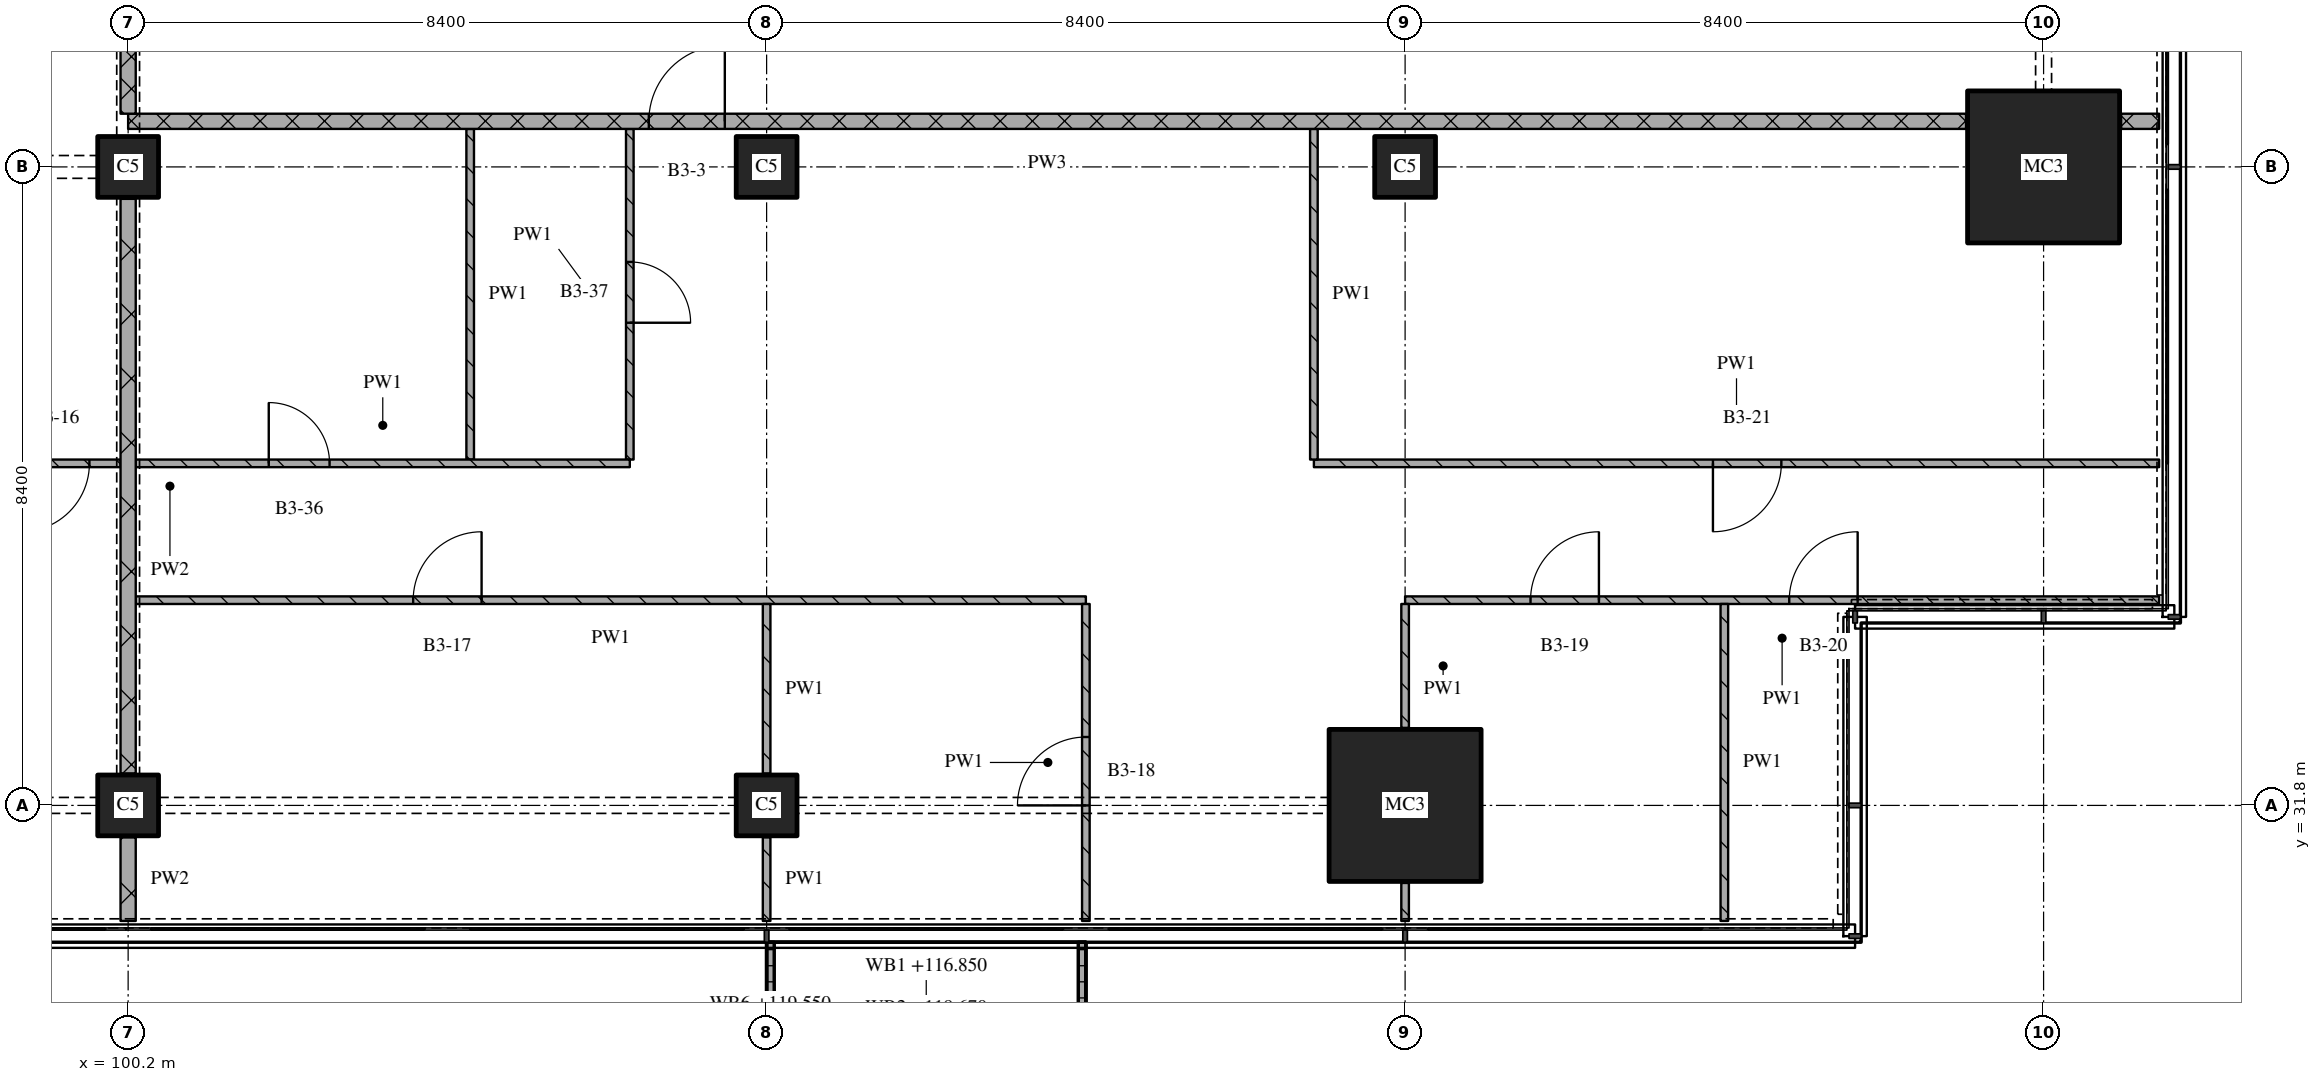
"""IFC4 building model, lengths in metres.
Left out: names, types, materials, properties, quantities, classifications, styles, units other than length and angle.
Written with IfcOpenShell. Run it as: python <this file> out.ifc"""

import sys

from ifc_helpers import new_model, si_unit, direction, frame, frame_2d, origin, origin_2d, place, context, subcontext, project, spatial, polyline, rectangle, outline, extrude, element, fill, save


model = new_model("IFC4")
c1 = context("Model", 3, precision=1e-05, world=origin(), true_north=direction((0.0, 1.0)))
c2 = subcontext(c1, "Body", "Model", "MODEL_VIEW")
j1 = project(units=[si_unit("LENGTHUNIT", "METRE"), si_unit("PLANEANGLEUNIT", "RADIAN")], contexts=[c1])
p1 = place(None, origin())
s1 = spatial("IfcSite", under=j1, at=p1, CompositionType="ELEMENT")
p2 = place(p1, origin())
s2 = spatial("IfcBuilding", under=s1, at=p2, CompositionType="ELEMENT")
p3 = place(p2, frame((0.0, 0.0, 116.85)))
s3 = spatial("IfcBuildingStorey", under=s2, at=p3, CompositionType="ELEMENT", Elevation=116.85)
for number, where, z_axis, x_axis in (
    (1, (100.2, 31.8, 0.0), (0.0, 0.0, 1.0), (1.0, 0.0, 0.0)),
    (2, (100.2, 40.2, 0.0), (0.0, 0.0, 1.0), (1.0, 0.0, 0.0)),
    (3, (108.6, 31.8, 0.0), (0.0, 0.0, 1.0), (1.0, 0.0, 0.0)),
    (4, (108.6, 40.2, 0.0), (0.0, 0.0, 1.0), (1.0, 0.0, 0.0)),
):
    element("IfcColumn", number, at=place(p3, frame(where, z_axis=z_axis, x_axis=x_axis)), inside=s3, PredefinedType="COLUMN", context=c2, shape_type="SweptSolid", body=[
        extrude(rectangle(XDim=0.8, YDim=0.8, at=origin_2d()), origin(), (0.0, 0.0, 1.0), 3.6),
    ])
p4 = place(p3, frame((117.0, 31.8, 0.0), z_axis=(0.0, 0.0, 1.0), x_axis=(1.0, 0.0, 0.0)))
e5 = element("IfcColumn", 5, at=p4, inside=s3, PredefinedType="COLUMN", context=c2, shape_type="SweptSolid", body=[
    extrude(rectangle(XDim=2.0, YDim=2.0, at=origin_2d()), origin(), (0.0, 0.0, 1.0), 3.6),
])
p5 = place(p3, frame((117.0, 40.2, 0.0), z_axis=(0.0, 0.0, 1.0), x_axis=(1.0, 0.0, 0.0)))
e6 = element("IfcColumn", 6, at=p5, inside=s3, PredefinedType="COLUMN", context=c2, shape_type="SweptSolid", body=[
    extrude(rectangle(XDim=0.8, YDim=0.8, at=origin_2d()), origin(), (0.0, 0.0, 1.0), 3.6),
])
p6 = place(p3, frame((125.4, 40.2, 0.0), z_axis=(0.0, 0.0, 1.0), x_axis=(1.0, 0.0, 0.0)))
e7 = element("IfcColumn", 7, at=p6, inside=s3, PredefinedType="COLUMN", context=c2, shape_type="SweptSolid", body=[
    extrude(rectangle(XDim=2.0, YDim=2.0, at=origin_2d()), origin(), (0.0, 0.0, 1.0), 3.6),
])
p7 = place(p3, origin())
e8 = element("IfcWall", 8, at=p7, inside=s3, PredefinedType="SOLIDWALL", context=c2, shape_type="SweptSolid", body=[
    extrude(outline(polyline([(108.6, 30.0), (108.7, 30.0), (108.7, 28.367), (112.7, 28.367), (112.7, 30.0), (112.8, 30.0), (112.8, 28.267), (108.6, 28.267), (108.6, 30.0)])), origin(), (0.0, 0.0, 1.0), 1.0),
])
p8 = place(p3, frame((112.8, 34.5, 0.0), z_axis=(0.0, 0.0, 1.0), x_axis=(-1.0, 0.0, 0.0)))
e9 = element("IfcWall", 9, at=p8, inside=s3, PredefinedType="PARTITIONING", context=c2, shape_type="SweptSolid", body=[
    extrude(rectangle(XDim=12.5, YDim=0.1, at=frame_2d((6.25, 0.0))), origin(), (0.0, 0.0, 1.0), 3.32),
])
p9 = place(p8, frame((7.95, 0.0, 0.0)))
e10 = element("IfcOpeningElement", 10, at=p9, cuts=e9, PredefinedType="OPENING", context=c2, shape_type="SweptSolid", body=[
    extrude(rectangle(XDim=0.9, YDim=2.1, at=frame_2d((0.45, 1.05))), frame((0.0, 0.06, 0.0), z_axis=(0.0, -1.0, 0.0), x_axis=(1.0, 0.0, 0.0)), (0.0, 0.0, 1.0), 0.12),
])
p10 = place(p3, frame((126.92, 34.5, 0.0), z_axis=(0.0, 0.0, 1.0), x_axis=(-1.0, 0.0, 0.0)))
e11 = element("IfcWall", 11, at=p10, inside=s3, PredefinedType="PARTITIONING", context=c2, shape_type="SweptSolid", body=[
    extrude(rectangle(XDim=9.92, YDim=0.1, at=frame_2d((4.96, 0.0))), origin(), (0.0, 0.0, 1.0), 3.32),
])
p11 = place(p10, frame((3.966, 0.0, 0.0)))
e12 = element("IfcOpeningElement", 12, at=p11, cuts=e11, PredefinedType="OPENING", context=c2, shape_type="SweptSolid", body=[
    extrude(rectangle(XDim=0.9, YDim=2.1, at=frame_2d((0.45, 1.05))), frame((0.0, 0.06, 0.0), z_axis=(0.0, -1.0, 0.0), x_axis=(1.0, 0.0, 0.0)), (0.0, 0.0, 1.0), 0.12),
])
p12 = place(p10, frame((7.37, 0.0, 0.0)))
e13 = element("IfcOpeningElement", 13, at=p12, cuts=e11, PredefinedType="OPENING", context=c2, shape_type="SweptSolid", body=[
    extrude(rectangle(XDim=0.9, YDim=2.1, at=frame_2d((0.45, 1.05))), frame((0.0, 0.06, 0.0), z_axis=(0.0, -1.0, 0.0), x_axis=(1.0, 0.0, 0.0)), (0.0, 0.0, 1.0), 0.12),
])
p13 = place(p3, frame((115.8, 36.3, 0.0), z_axis=(0.0, 0.0, 1.0), x_axis=(1.0, 0.0, 0.0)))
e14 = element("IfcWall", 14, at=p13, inside=s3, PredefinedType="PARTITIONING", context=c2, shape_type="SweptSolid", body=[
    extrude(rectangle(XDim=11.12, YDim=0.1, at=frame_2d((5.56, 0.0))), origin(), (0.0, 0.0, 1.0), 3.32),
])
p14 = place(p13, frame((5.25, 0.0, 0.0)))
e15 = element("IfcOpeningElement", 15, at=p14, cuts=e14, PredefinedType="OPENING", context=c2, shape_type="SweptSolid", body=[
    extrude(rectangle(XDim=0.9, YDim=2.1, at=frame_2d((0.45, 1.05))), frame((0.0, 0.06, 0.0), z_axis=(0.0, -1.0, 0.0), x_axis=(1.0, 0.0, 0.0)), (0.0, 0.0, 1.0), 0.12),
])
p15 = place(p3, frame((124.38, 40.8, 0.0), z_axis=(0.0, 0.0, 1.0), x_axis=(-1.0, 0.0, 0.0)))
e16 = element("IfcWall", 16, at=p15, inside=s3, PredefinedType="PARTITIONING", context=c2, shape_type="SweptSolid", body=[
    extrude(rectangle(XDim=24.18, YDim=0.2, at=frame_2d((12.09, 0.0))), origin(), (0.0, 0.0, 1.0), 3.32),
])
p16 = place(p15, frame((16.33, 0.0, 0.0)))
e17 = element("IfcOpeningElement", 17, at=p16, cuts=e16, PredefinedType="OPENING", context=c2, shape_type="SweptSolid", body=[
    extrude(rectangle(XDim=1.0, YDim=2.1, at=frame_2d((0.5, 1.05))), frame((0.0, 0.11, 0.0), z_axis=(0.0, -1.0, 0.0), x_axis=(1.0, 0.0, 0.0)), (0.0, 0.0, 1.0), 0.22),
])
p17 = place(p3, frame((126.42, 40.8, 0.0), z_axis=(0.0, 0.0, 1.0), x_axis=(1.0, 0.0, 0.0)))
e18 = element("IfcWall", 18, at=p17, inside=s3, PredefinedType="PARTITIONING", context=c2, shape_type="SweptSolid", body=[
    extrude(rectangle(XDim=0.5, YDim=0.2, at=frame_2d((0.25, 0.0))), origin(), (0.0, 0.0, 1.0), 3.32),
])
p18 = place(p3, frame((100.2, 43.1, 0.0), z_axis=(0.0, 0.0, 1.0), x_axis=(0.0, -1.0, 0.0)))
e19 = element("IfcWall", 19, at=p18, inside=s3, PredefinedType="PARTITIONING", context=c2, shape_type="SweptSolid", body=[
    extrude(rectangle(XDim=2.2, YDim=0.2, at=frame_2d((1.1, 0.0))), origin(), (0.0, 0.0, 1.0), 2.43),
])
p19 = place(p3, frame((100.2, 31.38, 0.0), z_axis=(0.0, 0.0, 1.0), x_axis=(0.0, -1.0, 0.0)))
e20 = element("IfcWall", 20, at=p19, inside=s3, PredefinedType="PARTITIONING", context=c2, shape_type="SweptSolid", body=[
    extrude(rectangle(XDim=1.1, YDim=0.2, at=frame_2d((0.55, 0.0))), origin(), (0.0, 0.0, 1.0), 3.32),
])
p20 = place(p3, frame((100.2, 39.78, 0.0), z_axis=(0.0, 0.0, 1.0), x_axis=(0.0, -1.0, 0.0)))
e21 = element("IfcWall", 21, at=p20, inside=s3, PredefinedType="PARTITIONING", context=c2, shape_type="SweptSolid", body=[
    extrude(rectangle(XDim=7.56, YDim=0.2, at=frame_2d((3.78, 0.0))), origin(), (0.0, 0.0, 1.0), 2.83),
])
p21 = place(p3, frame((104.7, 40.7, 0.0), z_axis=(0.0, 0.0, 1.0), x_axis=(0.0, -1.0, 0.0)))
e22 = element("IfcWall", 22, at=p21, inside=s3, PredefinedType="PARTITIONING", context=c2, shape_type="SweptSolid", body=[
    extrude(rectangle(XDim=4.35, YDim=0.1, at=frame_2d((2.175, 0.0))), origin(), (0.0, 0.0, 1.0), 3.32),
])
p22 = place(p3, frame((106.8, 36.35, 0.0), z_axis=(0.0, 0.0, 1.0), x_axis=(0.0, 1.0, 0.0)))
e23 = element("IfcWall", 23, at=p22, inside=s3, PredefinedType="PARTITIONING", context=c2, shape_type="SweptSolid", body=[
    extrude(rectangle(XDim=4.35, YDim=0.1, at=frame_2d((2.175, 0.0))), origin(), (0.0, 0.0, 1.0), 3.32),
])
p23 = place(p22, frame((1.8, 0.0, 0.0)))
e24 = element("IfcOpeningElement", 24, at=p23, cuts=e23, PredefinedType="OPENING", context=c2, shape_type="SweptSolid", body=[
    extrude(rectangle(XDim=0.8, YDim=2.1, at=frame_2d((0.4, 1.05))), frame((0.0, 0.06, 0.0), z_axis=(0.0, -1.0, 0.0), x_axis=(1.0, 0.0, 0.0)), (0.0, 0.0, 1.0), 0.12),
])
p24 = place(p3, frame((108.6, 31.38, 0.0), z_axis=(0.0, 0.0, 1.0), x_axis=(0.0, -1.0, 0.0)))
e25 = element("IfcWall", 25, at=p24, inside=s3, PredefinedType="PARTITIONING", context=c2, shape_type="SweptSolid", body=[
    extrude(rectangle(XDim=1.1, YDim=0.1, at=frame_2d((0.55, 0.0))), origin(), (0.0, 0.0, 1.0), 3.32),
])
p25 = place(p3, frame((108.6, 34.45, 0.0), z_axis=(0.0, 0.0, 1.0), x_axis=(0.0, -1.0, 0.0)))
e26 = element("IfcWall", 26, at=p25, inside=s3, PredefinedType="PARTITIONING", context=c2, shape_type="SweptSolid", body=[
    extrude(rectangle(XDim=2.23, YDim=0.1, at=frame_2d((1.115, 0.0))), origin(), (0.0, 0.0, 1.0), 3.32),
])
p26 = place(p3, frame((112.8, 30.28, 0.0), z_axis=(0.0, 0.0, 1.0), x_axis=(0.0, 1.0, 0.0)))
e27 = element("IfcWall", 27, at=p26, inside=s3, PredefinedType="PARTITIONING", context=c2, shape_type="SweptSolid", body=[
    extrude(rectangle(XDim=4.17, YDim=0.1, at=frame_2d((2.085, 0.0))), origin(), (0.0, 0.0, 1.0), 3.32),
])
p27 = place(p26, frame((1.52, 0.0, 0.0)))
e28 = element("IfcOpeningElement", 28, at=p27, cuts=e27, PredefinedType="OPENING", context=c2, shape_type="SweptSolid", body=[
    extrude(rectangle(XDim=0.9, YDim=2.1, at=frame_2d((0.45, 1.05))), frame((0.0, 0.06, 0.0), z_axis=(0.0, -1.0, 0.0), x_axis=(1.0, 0.0, 0.0)), (0.0, 0.0, 1.0), 0.12),
])
p28 = place(p3, frame((115.8, 40.7, 0.0), z_axis=(0.0, 0.0, 1.0), x_axis=(0.0, -1.0, 0.0)))
e29 = element("IfcWall", 29, at=p28, inside=s3, PredefinedType="PARTITIONING", context=c2, shape_type="SweptSolid", body=[
    extrude(rectangle(XDim=4.35, YDim=0.1, at=frame_2d((2.175, 0.0))), origin(), (0.0, 0.0, 1.0), 3.32),
])
p29 = place(p3, frame((117.0, 30.78, 0.0), z_axis=(0.0, 0.0, 1.0), x_axis=(0.0, -1.0, 0.0)))
e30 = element("IfcWall", 30, at=p29, inside=s3, PredefinedType="PARTITIONING", context=c2, shape_type="SweptSolid", body=[
    extrude(rectangle(XDim=0.5, YDim=0.1, at=frame_2d((0.25, 0.0))), origin(), (0.0, 0.0, 1.0), 3.32),
])
p30 = place(p3, frame((117.0, 34.45, 0.0), z_axis=(0.0, 0.0, 1.0), x_axis=(0.0, -1.0, 0.0)))
e31 = element("IfcWall", 31, at=p30, inside=s3, PredefinedType="PARTITIONING", context=c2, shape_type="SweptSolid", body=[
    extrude(rectangle(XDim=1.63, YDim=0.1, at=frame_2d((0.815, 0.0))), origin(), (0.0, 0.0, 1.0), 3.32),
])
p31 = place(p3, frame((121.2, 34.45, 0.0), z_axis=(0.0, 0.0, 1.0), x_axis=(0.0, -1.0, 0.0)))
e32 = element("IfcWall", 32, at=p31, inside=s3, PredefinedType="PARTITIONING", context=c2, shape_type="SweptSolid", body=[
    extrude(rectangle(XDim=4.17, YDim=0.1, at=frame_2d((2.085, 0.0))), origin(), (0.0, 0.0, 1.0), 3.32),
])
p32 = place(p3, frame((90.6, 36.3, 0.0), z_axis=(0.0, 0.0, 1.0), x_axis=(1.0, 0.0, 0.0)))
e33 = element("IfcWall", 33, at=p32, inside=s3, PredefinedType="PARTITIONING", context=c2, shape_type="SweptSolid", body=[
    extrude(rectangle(XDim=9.5, YDim=0.1, at=frame_2d((4.75, 0.0))), origin(), (0.0, 0.0, 1.0), 3.32),
])
p33 = place(p32, frame((5.361, 0.0, 0.0)))
e34 = element("IfcOpeningElement", 34, at=p33, cuts=e33, PredefinedType="OPENING", context=c2, shape_type="SweptSolid", body=[
    extrude(rectangle(XDim=0.8, YDim=2.1, at=frame_2d((0.4, 1.05))), frame((0.0, 0.06, 0.0), z_axis=(0.0, -1.0, 0.0), x_axis=(1.0, 0.0, 0.0)), (0.0, 0.0, 1.0), 0.12),
])
p34 = place(p32, frame((8.191, 0.0, 0.0)))
e35 = element("IfcOpeningElement", 35, at=p34, cuts=e33, PredefinedType="OPENING", context=c2, shape_type="SweptSolid", body=[
    extrude(rectangle(XDim=0.9, YDim=2.1, at=frame_2d((0.45, 1.05))), frame((0.0, 0.06, 0.0), z_axis=(0.0, -1.0, 0.0), x_axis=(1.0, 0.0, 0.0)), (0.0, 0.0, 1.0), 0.12),
])
p35 = place(p3, frame((100.3, 36.3, 0.0), z_axis=(0.0, 0.0, 1.0), x_axis=(1.0, 0.0, 0.0)))
e36 = element("IfcWall", 36, at=p35, inside=s3, PredefinedType="PARTITIONING", context=c2, shape_type="SweptSolid", body=[
    extrude(rectangle(XDim=6.5, YDim=0.1, at=frame_2d((3.25, 0.0))), origin(), (0.0, 0.0, 1.0), 3.32),
])
p36 = place(p35, frame((1.75, 0.0, 0.0)))
e37 = element("IfcOpeningElement", 37, at=p36, cuts=e36, PredefinedType="OPENING", context=c2, shape_type="SweptSolid", body=[
    extrude(rectangle(XDim=0.8, YDim=2.1, at=frame_2d((0.4, 1.05))), frame((0.0, 0.06, 0.0), z_axis=(0.0, -1.0, 0.0), x_axis=(1.0, 0.0, 0.0)), (0.0, 0.0, 1.0), 0.12),
])
p37 = place(p9, origin())
e38 = element("IfcDoor", 38, at=p37, inside=s3, OperationType="SINGLE_SWING_RIGHT", PredefinedType="DOOR", context=c2, shape_type="SweptSolid", body=[
    extrude(rectangle(XDim=0.9, YDim=2.1, at=frame_2d((0.45, 1.05))), frame((0.0, 0.025, 0.0), z_axis=(0.0, -1.0, 0.0), x_axis=(1.0, 0.0, 0.0)), (0.0, 0.0, 1.0), 0.05),
])
fill(e10, e38)
p38 = place(p11, origin())
e39 = element("IfcDoor", 39, at=p38, inside=s3, OperationType="SINGLE_SWING_RIGHT", PredefinedType="DOOR", context=c2, shape_type="SweptSolid", body=[
    extrude(rectangle(XDim=0.9, YDim=2.1, at=frame_2d((0.45, 1.05))), frame((0.0, 0.025, 0.0), z_axis=(0.0, -1.0, 0.0), x_axis=(1.0, 0.0, 0.0)), (0.0, 0.0, 1.0), 0.05),
])
fill(e12, e39)
p39 = place(p12, origin())
e40 = element("IfcDoor", 40, at=p39, inside=s3, OperationType="SINGLE_SWING_RIGHT", PredefinedType="DOOR", context=c2, shape_type="SweptSolid", body=[
    extrude(rectangle(XDim=0.9, YDim=2.1, at=frame_2d((0.45, 1.05))), frame((0.0, 0.025, 0.0), z_axis=(0.0, -1.0, 0.0), x_axis=(1.0, 0.0, 0.0)), (0.0, 0.0, 1.0), 0.05),
])
fill(e13, e40)
p40 = place(p14, origin())
e41 = element("IfcDoor", 41, at=p40, inside=s3, OperationType="SINGLE_SWING_RIGHT", PredefinedType="DOOR", context=c2, shape_type="SweptSolid", body=[
    extrude(rectangle(XDim=0.9, YDim=2.1, at=frame_2d((0.45, 1.05))), frame((0.0, 0.025, 0.0), z_axis=(0.0, -1.0, 0.0), x_axis=(1.0, 0.0, 0.0)), (0.0, 0.0, 1.0), 0.05),
])
fill(e15, e41)
p41 = place(p16, origin())
e42 = element("IfcDoor", 42, at=p41, inside=s3, OperationType="SINGLE_SWING_RIGHT", PredefinedType="DOOR", context=c2, shape_type="SweptSolid", body=[
    extrude(rectangle(XDim=1.0, YDim=2.1, at=frame_2d((0.5, 1.05))), frame((0.0, 0.025, 0.0), z_axis=(0.0, -1.0, 0.0), x_axis=(1.0, 0.0, 0.0)), (0.0, 0.0, 1.0), 0.05),
])
fill(e17, e42)
p42 = place(p23, origin())
e43 = element("IfcDoor", 43, at=p42, inside=s3, OperationType="SINGLE_SWING_RIGHT", PredefinedType="DOOR", context=c2, shape_type="SweptSolid", body=[
    extrude(rectangle(XDim=0.8, YDim=2.1, at=frame_2d((0.4, 1.05))), frame((0.0, 0.025, 0.0), z_axis=(0.0, -1.0, 0.0), x_axis=(1.0, 0.0, 0.0)), (0.0, 0.0, 1.0), 0.05),
])
fill(e24, e43)
p43 = place(p27, origin())
e44 = element("IfcDoor", 44, at=p43, inside=s3, OperationType="SINGLE_SWING_LEFT", PredefinedType="DOOR", context=c2, shape_type="SweptSolid", body=[
    extrude(rectangle(XDim=0.9, YDim=2.1, at=frame_2d((0.45, 1.05))), frame((0.0, 0.025, 0.0), z_axis=(0.0, -1.0, 0.0), x_axis=(1.0, 0.0, 0.0)), (0.0, 0.0, 1.0), 0.05),
])
fill(e28, e44)
p44 = place(p34, origin())
e45 = element("IfcDoor", 45, at=p44, inside=s3, OperationType="SINGLE_SWING_RIGHT", PredefinedType="DOOR", context=c2, shape_type="SweptSolid", body=[
    extrude(rectangle(XDim=0.9, YDim=2.1, at=frame_2d((0.45, 1.05))), frame((0.0, 0.025, 0.0), z_axis=(0.0, -1.0, 0.0), x_axis=(1.0, 0.0, 0.0)), (0.0, 0.0, 1.0), 0.05),
])
fill(e35, e45)
p45 = place(p36, origin())
e46 = element("IfcDoor", 46, at=p45, inside=s3, OperationType="SINGLE_SWING_LEFT", PredefinedType="DOOR", context=c2, shape_type="SweptSolid", body=[
    extrude(rectangle(XDim=0.8, YDim=2.1, at=frame_2d((0.4, 1.05))), frame((0.0, 0.025, 0.0), z_axis=(0.0, -1.0, 0.0), x_axis=(1.0, 0.0, 0.0)), (0.0, 0.0, 1.0), 0.05),
])
fill(e37, e46)
save(model, sys.argv[1])
